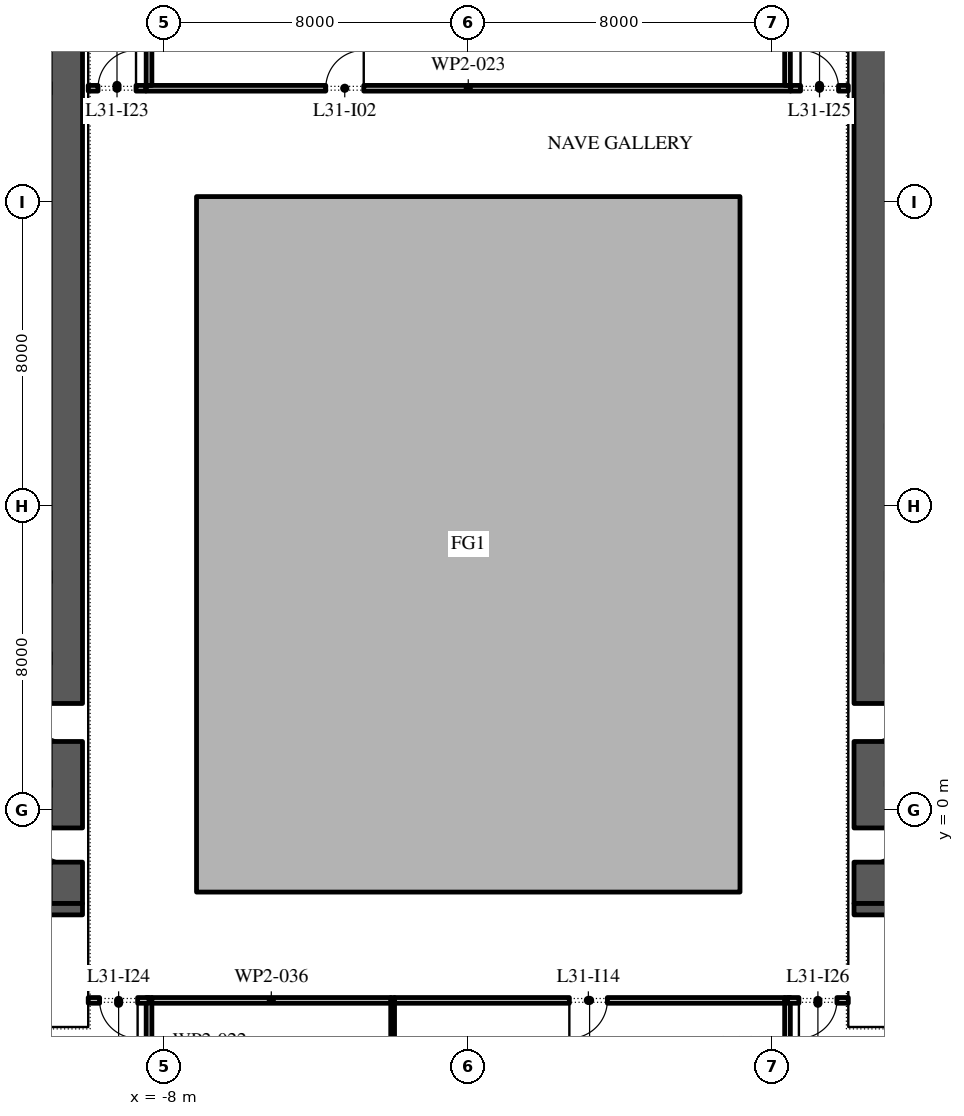
"""IFC4 building model, lengths in metres.
Left out: names, types, materials, properties, quantities, classifications, styles, units other than length and angle.
Written with IfcOpenShell. Run it as: python <this file> out.ifc"""

import sys

from ifc_helpers import new_model, si_unit, direction, frame, frame_2d, origin, place, context, subcontext, project, spatial, polyline, rectangle, outline, extrude, element, fill, save


model = new_model("IFC4")
c1 = context("Model", 3, precision=1e-05, world=origin(), true_north=direction((0.0, 1.0)))
c2 = subcontext(c1, "Body", "Model", "MODEL_VIEW")
j1 = project(units=[si_unit("LENGTHUNIT", "METRE"), si_unit("PLANEANGLEUNIT", "RADIAN")], contexts=[c1])
p1 = place(None, origin())
s1 = spatial("IfcSite", under=j1, at=p1, CompositionType="ELEMENT")
p2 = place(p1, origin())
s2 = spatial("IfcBuilding", under=s1, at=p2, CompositionType="ELEMENT")
p3 = place(p2, frame((0.0, 0.0, 143.4)))
s3 = spatial("IfcBuildingStorey", under=s2, at=p3, CompositionType="ELEMENT", Elevation=143.4)
p4 = place(p3, origin())
e1 = element("IfcWall", 1, at=p4, inside=s3, PredefinedType="STANDARD", context=c2, shape_type="SweptSolid", body=[
    extrude(outline(polyline([(-7.15, -2.15), (7.15, -2.15), (7.15, 16.15), (-7.15, 16.15), (-7.15, -2.15)]), holes=[polyline([(-7.0, -2.0), (-7.0, 16.0), (7.0, 16.0), (7.0, -2.0), (-7.0, -2.0)])]), origin(), (0.0, 0.0, 1.0), 4.0),
])
p5 = place(p3, frame((-10.575, -2.45, 0.0), z_axis=(0.0, 0.0, 1.0), x_axis=(0.0, 1.0, 0.0)))
e2 = element("IfcWall", 2, at=p5, inside=s3, PredefinedType="SHEAR", context=c2, shape_type="SweptSolid", body=[
    extrude(rectangle(XDim=27.9, YDim=0.85, at=frame_2d((13.95, 0.0))), origin(), (0.0, 0.0, 1.0), 4.0),
])
p6 = place(p5, frame((23.65, 0.0, 0.0)))
e3 = element("IfcOpeningElement", 3, at=p6, cuts=e2, PredefinedType="OPENING", context=c2, shape_type="SweptSolid", body=[
    extrude(rectangle(XDim=2.4, YDim=2.1, at=frame_2d((1.2, 1.05))), frame((0.0, 0.435, 0.0), z_axis=(0.0, -1.0, 0.0), x_axis=(1.0, 0.0, 0.0)), (0.0, 0.0, 1.0), 0.87),
])
p7 = place(p5, frame((1.087, 0.0, 0.0)))
e4 = element("IfcOpeningElement", 4, at=p7, cuts=e2, PredefinedType="OPENING", context=c2, shape_type="SweptSolid", body=[
    extrude(rectangle(XDim=0.9, YDim=2.1, at=frame_2d((0.45, 1.05))), frame((0.0, 0.435, 0.0), z_axis=(0.0, -1.0, 0.0), x_axis=(1.0, 0.0, 0.0)), (0.0, 0.0, 1.0), 0.87),
])
p8 = place(p5, frame((4.262, 0.0, 0.0)))
e5 = element("IfcOpeningElement", 5, at=p8, cuts=e2, PredefinedType="OPENING", context=c2, shape_type="SweptSolid", body=[
    extrude(rectangle(XDim=1.0, YDim=2.1, at=frame_2d((0.5, 1.05))), frame((0.0, 0.435, 0.0), z_axis=(0.0, -1.0, 0.0), x_axis=(1.0, 0.0, 0.0)), (0.0, 0.0, 1.0), 0.87),
])
p9 = place(p3, frame((-21.85, -2.6, 0.0), z_axis=(0.0, 0.0, 1.0), x_axis=(1.0, 0.0, 0.0)))
e6 = element("IfcWall", 6, at=p9, inside=s3, PredefinedType="SHEAR", context=c2, shape_type="SweptSolid", body=[
    extrude(rectangle(XDim=11.7, YDim=0.3, at=frame_2d((5.85, 0.0))), origin(), (0.0, 0.0, 1.0), 4.0),
])
p10 = place(p3, frame((10.575, -2.45, 0.0), z_axis=(0.0, 0.0, 1.0), x_axis=(0.0, 1.0, 0.0)))
e7 = element("IfcWall", 7, at=p10, inside=s3, PredefinedType="SHEAR", context=c2, shape_type="SweptSolid", body=[
    extrude(rectangle(XDim=27.9, YDim=0.85, at=frame_2d((13.95, 0.0))), origin(), (0.0, 0.0, 1.0), 4.0),
])
p11 = place(p10, frame((23.65, 0.0, 0.0)))
e8 = element("IfcOpeningElement", 8, at=p11, cuts=e7, PredefinedType="OPENING", context=c2, shape_type="SweptSolid", body=[
    extrude(rectangle(XDim=2.4, YDim=2.1, at=frame_2d((1.2, 1.05))), frame((0.0, 0.435, 0.0), z_axis=(0.0, -1.0, 0.0), x_axis=(1.0, 0.0, 0.0)), (0.0, 0.0, 1.0), 0.87),
])
p12 = place(p10, frame((1.087, 0.0, 0.0)))
e9 = element("IfcOpeningElement", 9, at=p12, cuts=e7, PredefinedType="OPENING", context=c2, shape_type="SweptSolid", body=[
    extrude(rectangle(XDim=0.9, YDim=2.1, at=frame_2d((0.45, 1.05))), frame((0.0, 0.435, 0.0), z_axis=(0.0, -1.0, 0.0), x_axis=(1.0, 0.0, 0.0)), (0.0, 0.0, 1.0), 0.87),
])
p13 = place(p10, frame((4.262, 0.0, 0.0)))
e10 = element("IfcOpeningElement", 10, at=p13, cuts=e7, PredefinedType="OPENING", context=c2, shape_type="SweptSolid", body=[
    extrude(rectangle(XDim=1.0, YDim=2.1, at=frame_2d((0.5, 1.05))), frame((0.0, 0.435, 0.0), z_axis=(0.0, -1.0, 0.0), x_axis=(1.0, 0.0, 0.0)), (0.0, 0.0, 1.0), 0.87),
])
p14 = place(p3, frame((10.15, -2.6, 0.0), z_axis=(0.0, 0.0, 1.0), x_axis=(1.0, 0.0, 0.0)))
e11 = element("IfcWall", 11, at=p14, inside=s3, PredefinedType="SHEAR", context=c2, shape_type="SweptSolid", body=[
    extrude(rectangle(XDim=11.7, YDim=0.3, at=frame_2d((5.85, 0.0))), origin(), (0.0, 0.0, 1.0), 4.0),
])
p15 = place(p3, frame((-8.4, -4.925, 0.0), z_axis=(0.0, 0.0, 1.0), x_axis=(0.0, -1.0, 0.0)))
e12 = element("IfcWall", 12, at=p15, inside=s3, PredefinedType="PARTITIONING", context=c2, shape_type="SweptSolid", body=[
    extrude(rectangle(XDim=2.3, YDim=0.15, at=frame_2d((1.15, 0.0))), origin(), (0.0, 0.0, 1.0), 4.0),
])
p16 = place(p3, frame((-8.475, 19.0, 0.0), z_axis=(0.0, 0.0, 1.0), x_axis=(1.0, 0.0, 0.0)))
e13 = element("IfcWall", 13, at=p16, inside=s3, PredefinedType="PARTITIONING", context=c2, shape_type="SweptSolid", body=[
    extrude(rectangle(XDim=16.95, YDim=0.15, at=frame_2d((8.475, 0.0))), origin(), (0.0, 0.0, 1.0), 4.0),
])
p17 = place(p16, frame((4.725, 0.0, 0.0)))
e14 = element("IfcOpeningElement", 14, at=p17, cuts=e13, PredefinedType="OPENING", context=c2, shape_type="SweptSolid", body=[
    extrude(rectangle(XDim=1.0, YDim=2.1, at=frame_2d((0.5, 1.05))), frame((0.0, 0.085, 0.0), z_axis=(0.0, -1.0, 0.0), x_axis=(1.0, 0.0, 0.0)), (0.0, 0.0, 1.0), 0.17),
])
p18 = place(p3, frame((-8.4, 23.485, 0.0), z_axis=(0.0, 0.0, 1.0), x_axis=(0.0, -1.0, 0.0)))
e15 = element("IfcWall", 15, at=p18, inside=s3, PredefinedType="PARTITIONING", context=c2, shape_type="SweptSolid", body=[
    extrude(rectangle(XDim=4.41, YDim=0.15, at=frame_2d((2.205, 0.0))), origin(), (0.0, 0.0, 1.0), 4.0),
])
p19 = place(p3, frame((-1.99, -11.2, 0.0), z_axis=(0.0, 0.0, 1.0), x_axis=(0.0, 1.0, 0.0)))
e16 = element("IfcWall", 16, at=p19, inside=s3, PredefinedType="PARTITIONING", context=c2, shape_type="SweptSolid", body=[
    extrude(rectangle(XDim=6.275, YDim=0.1, at=frame_2d((3.137, 0.0))), origin(), (0.0, 0.0, 1.0), 3.02),
])
p20 = place(p3, frame((-2.04, -5.0, 0.0), z_axis=(0.0, 0.0, 1.0), x_axis=(-1.0, 0.0, 0.0)))
e17 = element("IfcWall", 17, at=p20, inside=s3, PredefinedType="PARTITIONING", context=c2, shape_type="SweptSolid", body=[
    extrude(rectangle(XDim=6.285, YDim=0.15, at=frame_2d((3.143, 0.0))), origin(), (0.0, 0.0, 1.0), 4.0),
])
p21 = place(p3, frame((8.4, -7.375, 0.0), z_axis=(0.0, 0.0, 1.0), x_axis=(0.0, 1.0, 0.0)))
e18 = element("IfcWall", 18, at=p21, inside=s3, PredefinedType="PARTITIONING", context=c2, shape_type="SweptSolid", body=[
    extrude(rectangle(XDim=2.45, YDim=0.15, at=frame_2d((1.225, 0.0))), origin(), (0.0, 0.0, 1.0), 4.0),
])
p22 = place(p3, frame((8.325, -5.0, 0.0), z_axis=(0.0, 0.0, 1.0), x_axis=(-1.0, 0.0, 0.0)))
e19 = element("IfcWall", 19, at=p22, inside=s3, PredefinedType="PARTITIONING", context=c2, shape_type="SweptSolid", body=[
    extrude(rectangle(XDim=10.265, YDim=0.15, at=frame_2d((5.132, 0.0))), origin(), (0.0, 0.0, 1.0), 4.0),
])
p23 = place(p22, frame((4.665, 0.0, 0.0)))
e20 = element("IfcOpeningElement", 20, at=p23, cuts=e19, PredefinedType="OPENING", context=c2, shape_type="SweptSolid", body=[
    extrude(rectangle(XDim=1.0, YDim=2.1, at=frame_2d((0.5, 1.05))), frame((0.0, 0.085, 0.0), z_axis=(0.0, -1.0, 0.0), x_axis=(1.0, 0.0, 0.0)), (0.0, 0.0, 1.0), 0.17),
])
p24 = place(p3, frame((8.4, 19.075, 0.0), z_axis=(0.0, 0.0, 1.0), x_axis=(0.0, 1.0, 0.0)))
e21 = element("IfcWall", 21, at=p24, inside=s3, PredefinedType="PARTITIONING", context=c2, shape_type="SweptSolid", body=[
    extrude(rectangle(XDim=4.41, YDim=0.15, at=frame_2d((2.205, 0.0))), origin(), (0.0, 0.0, 1.0), 4.0),
])
p25 = place(p3, frame((-10.0, 19.0, 0.0), z_axis=(0.0, 0.0, 1.0), x_axis=(1.0, 0.0, 0.0)))
e22 = element("IfcWall", 22, at=p25, inside=s3, PredefinedType="PARTITIONING", context=c2, shape_type="SweptSolid", body=[
    extrude(rectangle(XDim=1.515, YDim=0.15, at=frame_2d((0.757, 0.0))), origin(), (0.0, 0.0, 1.0), 4.0),
])
p26 = place(p25, frame((0.258, 0.0, 0.0)))
e23 = element("IfcOpeningElement", 23, at=p26, cuts=e22, PredefinedType="OPENING", context=c2, shape_type="SweptSolid", body=[
    extrude(rectangle(XDim=1.0, YDim=2.1, at=frame_2d((0.5, 1.05))), frame((0.0, 0.085, 0.0), z_axis=(0.0, -1.0, 0.0), x_axis=(1.0, 0.0, 0.0)), (0.0, 0.0, 1.0), 0.17),
])
p27 = place(p3, frame((-8.4, -5.0, 0.0), z_axis=(0.0, 0.0, 1.0), x_axis=(-1.0, 0.0, 0.0)))
e24 = element("IfcWall", 24, at=p27, inside=s3, PredefinedType="PARTITIONING", context=c2, shape_type="SweptSolid", body=[
    extrude(rectangle(XDim=1.6, YDim=0.15, at=frame_2d((0.8, 0.0))), origin(), (0.0, 0.0, 1.0), 4.0),
])
p28 = place(p27, frame((0.3, 0.0, 0.0)))
e25 = element("IfcOpeningElement", 25, at=p28, cuts=e24, PredefinedType="OPENING", context=c2, shape_type="SweptSolid", body=[
    extrude(rectangle(XDim=1.0, YDim=2.1, at=frame_2d((0.5, 1.05))), frame((0.0, 0.085, 0.0), z_axis=(0.0, -1.0, 0.0), x_axis=(1.0, 0.0, 0.0)), (0.0, 0.0, 1.0), 0.17),
])
p29 = place(p3, frame((8.485, 19.0, 0.0), z_axis=(0.0, 0.0, 1.0), x_axis=(1.0, 0.0, 0.0)))
e26 = element("IfcWall", 26, at=p29, inside=s3, PredefinedType="PARTITIONING", context=c2, shape_type="SweptSolid", body=[
    extrude(rectangle(XDim=1.515, YDim=0.15, at=frame_2d((0.757, 0.0))), origin(), (0.0, 0.0, 1.0), 4.0),
])
p30 = place(p29, frame((0.258, 0.0, 0.0)))
e27 = element("IfcOpeningElement", 27, at=p30, cuts=e26, PredefinedType="OPENING", context=c2, shape_type="SweptSolid", body=[
    extrude(rectangle(XDim=1.0, YDim=2.1, at=frame_2d((0.5, 1.05))), frame((0.0, 0.085, 0.0), z_axis=(0.0, -1.0, 0.0), x_axis=(1.0, 0.0, 0.0)), (0.0, 0.0, 1.0), 0.17),
])
p31 = place(p3, frame((10.0, -5.0, 0.0), z_axis=(0.0, 0.0, 1.0), x_axis=(-1.0, 0.0, 0.0)))
e28 = element("IfcWall", 28, at=p31, inside=s3, PredefinedType="PARTITIONING", context=c2, shape_type="SweptSolid", body=[
    extrude(rectangle(XDim=1.6, YDim=0.15, at=frame_2d((0.8, 0.0))), origin(), (0.0, 0.0, 1.0), 4.0),
])
p32 = place(p31, frame((0.3, 0.0, 0.0)))
e29 = element("IfcOpeningElement", 29, at=p32, cuts=e28, PredefinedType="OPENING", context=c2, shape_type="SweptSolid", body=[
    extrude(rectangle(XDim=1.0, YDim=2.1, at=frame_2d((0.5, 1.05))), frame((0.0, 0.085, 0.0), z_axis=(0.0, -1.0, 0.0), x_axis=(1.0, 0.0, 0.0)), (0.0, 0.0, 1.0), 0.17),
])
p33 = place(p7, origin())
e30 = element("IfcDoor", 30, at=p33, inside=s3, OperationType="SINGLE_SWING_LEFT", PredefinedType="DOOR", context=c2, shape_type="SweptSolid", body=[
    extrude(rectangle(XDim=0.9, YDim=2.1, at=frame_2d((0.45, 1.05))), frame((0.0, 0.425, 0.0), z_axis=(0.0, -1.0, 0.0), x_axis=(1.0, 0.0, 0.0)), (0.0, 0.0, 1.0), 0.05),
])
fill(e4, e30)
p34 = place(p8, origin())
e31 = element("IfcDoor", 31, at=p34, inside=s3, OperationType="SINGLE_SWING_LEFT", PredefinedType="DOOR", context=c2, shape_type="SweptSolid", body=[
    extrude(rectangle(XDim=1.0, YDim=2.1, at=frame_2d((0.5, 1.05))), frame((0.0, 0.425, 0.0), z_axis=(0.0, -1.0, 0.0), x_axis=(1.0, 0.0, 0.0)), (0.0, 0.0, 1.0), 0.05),
])
fill(e5, e31)
p35 = place(p12, frame((0.9, -0.8, 0.0), z_axis=(0.0, 0.0, 1.0), x_axis=(-1.0, 0.0, 0.0)))
e32 = element("IfcDoor", 32, at=p35, inside=s3, OperationType="SINGLE_SWING_RIGHT", PredefinedType="DOOR", context=c2, shape_type="SweptSolid", body=[
    extrude(rectangle(XDim=0.9, YDim=2.1, at=frame_2d((0.45, 1.05))), frame((0.0, -0.375, 0.0), z_axis=(0.0, -1.0, 0.0), x_axis=(1.0, 0.0, 0.0)), (0.0, 0.0, 1.0), 0.05),
])
fill(e9, e32)
p36 = place(p13, frame((1.0, -0.8, 0.0), z_axis=(0.0, 0.0, 1.0), x_axis=(-1.0, 0.0, 0.0)))
e33 = element("IfcDoor", 33, at=p36, inside=s3, OperationType="SINGLE_SWING_RIGHT", PredefinedType="DOOR", context=c2, shape_type="SweptSolid", body=[
    extrude(rectangle(XDim=1.0, YDim=2.1, at=frame_2d((0.5, 1.05))), frame((0.0, -0.375, 0.0), z_axis=(0.0, -1.0, 0.0), x_axis=(1.0, 0.0, 0.0)), (0.0, 0.0, 1.0), 0.05),
])
fill(e10, e33)
p37 = place(p17, origin())
e34 = element("IfcDoor", 34, at=p37, inside=s3, OperationType="SINGLE_SWING_LEFT", PredefinedType="DOOR", context=c2, shape_type="SweptSolid", body=[
    extrude(rectangle(XDim=1.0, YDim=2.1, at=frame_2d((0.5, 1.05))), frame((0.0, 0.025, 0.0), z_axis=(0.0, -1.0, 0.0), x_axis=(1.0, 0.0, 0.0)), (0.0, 0.0, 1.0), 0.05),
])
fill(e14, e34)
p38 = place(p23, origin())
e35 = element("IfcDoor", 35, at=p38, inside=s3, OperationType="SINGLE_SWING_LEFT", PredefinedType="DOOR", context=c2, shape_type="SweptSolid", body=[
    extrude(rectangle(XDim=1.0, YDim=2.1, at=frame_2d((0.5, 1.05))), frame((0.0, 0.025, 0.0), z_axis=(0.0, -1.0, 0.0), x_axis=(1.0, 0.0, 0.0)), (0.0, 0.0, 1.0), 0.05),
])
fill(e20, e35)
p39 = place(p26, origin())
e36 = element("IfcDoor", 36, at=p39, inside=s3, OperationType="SINGLE_SWING_LEFT", PredefinedType="DOOR", context=c2, shape_type="SweptSolid", body=[
    extrude(rectangle(XDim=1.0, YDim=2.1, at=frame_2d((0.5, 1.05))), frame((0.0, 0.025, 0.0), z_axis=(0.0, -1.0, 0.0), x_axis=(1.0, 0.0, 0.0)), (0.0, 0.0, 1.0), 0.05),
])
fill(e23, e36)
p40 = place(p28, origin())
e37 = element("IfcDoor", 37, at=p40, inside=s3, OperationType="SINGLE_SWING_RIGHT", PredefinedType="DOOR", context=c2, shape_type="SweptSolid", body=[
    extrude(rectangle(XDim=1.0, YDim=2.1, at=frame_2d((0.5, 1.05))), frame((0.0, 0.025, 0.0), z_axis=(0.0, -1.0, 0.0), x_axis=(1.0, 0.0, 0.0)), (0.0, 0.0, 1.0), 0.05),
])
fill(e25, e37)
p41 = place(p30, origin())
e38 = element("IfcDoor", 38, at=p41, inside=s3, OperationType="SINGLE_SWING_RIGHT", PredefinedType="DOOR", context=c2, shape_type="SweptSolid", body=[
    extrude(rectangle(XDim=1.0, YDim=2.1, at=frame_2d((0.5, 1.05))), frame((0.0, 0.025, 0.0), z_axis=(0.0, -1.0, 0.0), x_axis=(1.0, 0.0, 0.0)), (0.0, 0.0, 1.0), 0.05),
])
fill(e27, e38)
p42 = place(p32, origin())
e39 = element("IfcDoor", 39, at=p42, inside=s3, OperationType="SINGLE_SWING_LEFT", PredefinedType="DOOR", context=c2, shape_type="SweptSolid", body=[
    extrude(rectangle(XDim=1.0, YDim=2.1, at=frame_2d((0.5, 1.05))), frame((0.0, 0.025, 0.0), z_axis=(0.0, -1.0, 0.0), x_axis=(1.0, 0.0, 0.0)), (0.0, 0.0, 1.0), 0.05),
])
fill(e29, e39)
save(model, sys.argv[1])
